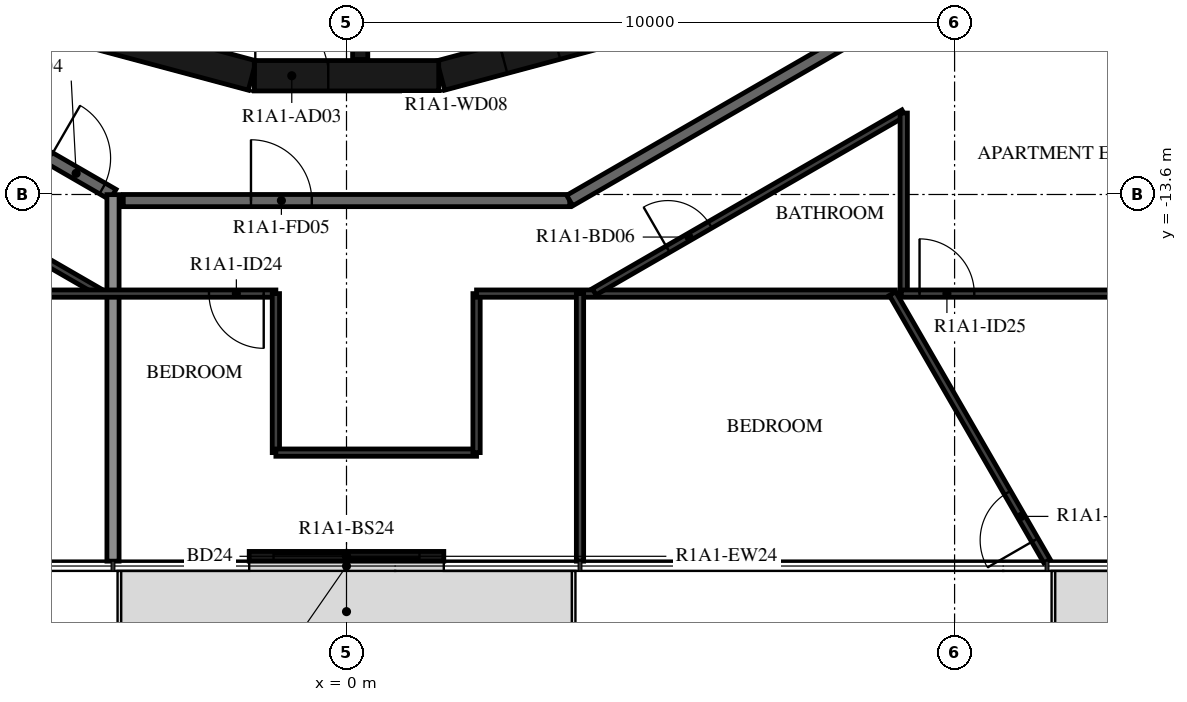
"""IFC4 building model, lengths in metres.
Left out: names, types, materials, properties, quantities, classifications, styles, units other than length and angle.
Written with IfcOpenShell. Run it as: python <this file> out.ifc"""

import sys

from ifc_helpers import new_model, si_unit, direction, frame, frame_2d, origin, place, context, subcontext, project, spatial, rectangle, extrude, element, fill, save


model = new_model("IFC4")
c1 = context("Model", 3, precision=1e-05, world=origin(), true_north=direction((0.0, 1.0)))
c2 = subcontext(c1, "Body", "Model", "MODEL_VIEW")
j1 = project(units=[si_unit("LENGTHUNIT", "METRE"), si_unit("PLANEANGLEUNIT", "RADIAN")], contexts=[c1])
p1 = place(None, origin())
s1 = spatial("IfcSite", under=j1, at=p1, CompositionType="ELEMENT")
p2 = place(p1, origin())
s2 = spatial("IfcBuilding", under=s1, at=p2, CompositionType="ELEMENT")
p3 = place(p2, frame((0.0, 0.0, 41.9)))
s3 = spatial("IfcBuildingStorey", under=s2, at=p3, CompositionType="ELEMENT", Elevation=41.9)
p4 = place(p3, frame((-1.6, -19.55, 0.0), z_axis=(0.0, 0.0, 1.0), x_axis=(1.0, 0.0, 0.0)))
e1 = element("IfcWall", 1, at=p4, inside=s3, PredefinedType="STANDARD", context=c2, shape_type="SweptSolid", body=[
    extrude(rectangle(XDim=3.2, YDim=0.16, at=frame_2d((1.6, 0.0))), origin(), (0.0, 0.0, 1.0), 3.12),
])
p5 = place(p4, frame((0.4, 0.0, 0.0)))
e2 = element("IfcOpeningElement", 2, at=p5, cuts=e1, PredefinedType="OPENING", context=c2, shape_type="SweptSolid", body=[
    extrude(rectangle(XDim=2.4, YDim=2.4, at=frame_2d((1.2, 1.2))), frame((0.0, 0.09, 0.0), z_axis=(0.0, -1.0, 0.0), x_axis=(1.0, 0.0, 0.0)), (0.0, 0.0, 1.0), 0.18),
])
p6 = place(p3, frame((1.55, -11.643, 0.0), z_axis=(0.0, 0.0, 1.0), x_axis=(0.965948410781, 0.258734743916, 0.0)))
e3 = element("IfcWall", 3, at=p6, inside=s3, PredefinedType="SHEAR", context=c2, shape_type="SweptSolid", body=[
    extrude(rectangle(XDim=3.033, YDim=0.5, at=frame_2d((1.516, 0.0))), origin(), (0.0, 0.0, 1.0), 3.12),
])
p7 = place(p6, frame((1.066, 0.0, 0.0)))
e4 = element("IfcOpeningElement", 4, at=p7, cuts=e3, PredefinedType="OPENING", context=c2, shape_type="SweptSolid", body=[
    extrude(rectangle(XDim=0.9, YDim=2.1, at=frame_2d((0.45, 1.05))), frame((0.0, 0.26, 0.0), z_axis=(0.0, -1.0, 0.0), x_axis=(1.0, 0.0, 0.0)), (0.0, 0.0, 1.0), 0.52),
])
p8 = place(p3, frame((-4.479, -10.858, 0.0), z_axis=(0.0, 0.0, 1.0), x_axis=(0.965948410781, -0.258734743916, 0.0)))
e5 = element("IfcWall", 5, at=p8, inside=s3, PredefinedType="SHEAR", context=c2, shape_type="SweptSolid", body=[
    extrude(rectangle(XDim=3.033, YDim=0.5, at=frame_2d((1.516, 0.0))), origin(), (0.0, 0.0, 1.0), 3.12),
])
p9 = place(p3, frame((-1.516, -11.647, 0.0), z_axis=(0.0, 0.0, 1.0), x_axis=(1.0, 0.0, 0.0)))
e6 = element("IfcWall", 6, at=p9, inside=s3, PredefinedType="SHEAR", context=c2, shape_type="SweptSolid", body=[
    extrude(rectangle(XDim=3.033, YDim=0.5, at=frame_2d((1.516, 0.0))), origin(), (0.0, 0.0, 1.0), 3.12),
])
p10 = place(p9, frame((0.016, 0.0, 0.0)))
e7 = element("IfcOpeningElement", 7, at=p10, cuts=e6, PredefinedType="OPENING", context=c2, shape_type="SweptSolid", body=[
    extrude(rectangle(XDim=1.2, YDim=2.1, at=frame_2d((0.6, 1.05))), frame((0.0, 0.26, 0.0), z_axis=(0.0, -1.0, 0.0), x_axis=(1.0, 0.0, 0.0)), (0.0, 0.0, 1.0), 0.52),
])
p11 = place(p3, frame((0.225, -8.97, 0.0), z_axis=(0.0, 0.0, 1.0), x_axis=(0.0, -1.0, 0.0)))
e8 = element("IfcWall", 8, at=p11, inside=s3, PredefinedType="SHEAR", context=c2, shape_type="SweptSolid", body=[
    extrude(rectangle(XDim=2.41, YDim=0.25, at=frame_2d((1.205, 0.0))), origin(), (0.0, 0.0, 1.0), 3.12),
])
p12 = place(p3, frame((-10.029, -10.029, 0.0), z_axis=(0.0, 0.0, 1.0), x_axis=(0.866022878987, -0.500004373052, 0.0)))
e9 = element("IfcWall", 9, at=p12, inside=s3, PredefinedType="STANDARD", context=c2, shape_type="SweptSolid", body=[
    extrude(rectangle(XDim=7.146, YDim=0.2, at=frame_2d((3.573, 0.0))), origin(), (0.0, 0.0, 1.0), 3.12),
])
p13 = place(p12, frame((5.947, 0.0, 0.0)))
e10 = element("IfcOpeningElement", 10, at=p13, cuts=e9, PredefinedType="OPENING", context=c2, shape_type="SweptSolid", body=[
    extrude(rectangle(XDim=1.0, YDim=2.1, at=frame_2d((0.5, 1.05))), frame((0.0, 0.11, 0.0), z_axis=(0.0, -1.0, 0.0), x_axis=(1.0, 0.0, 0.0)), (0.0, 0.0, 1.0), 0.22),
])
p14 = place(p3, frame((-3.671, -13.7, 0.0), z_axis=(0.0, 0.0, 1.0), x_axis=(1.0, 0.0, 0.0)))
e11 = element("IfcWall", 11, at=p14, inside=s3, PredefinedType="STANDARD", context=c2, shape_type="SweptSolid", body=[
    extrude(rectangle(XDim=7.342, YDim=0.2, at=frame_2d((3.671, 0.0))), origin(), (0.0, 0.0, 1.0), 3.12),
])
p15 = place(p14, frame((2.1, 0.0, 0.0)))
e12 = element("IfcOpeningElement", 12, at=p15, cuts=e11, PredefinedType="OPENING", context=c2, shape_type="SweptSolid", body=[
    extrude(rectangle(XDim=1.0, YDim=2.1, at=frame_2d((0.5, 1.05))), frame((0.0, 0.11, 0.0), z_axis=(0.0, -1.0, 0.0), x_axis=(1.0, 0.0, 0.0)), (0.0, 0.0, 1.0), 0.22),
])
p16 = place(p3, frame((3.671, -13.7, 0.0), z_axis=(0.0, 0.0, 1.0), x_axis=(0.866024439905, 0.500001669485, 0.0)))
e13 = element("IfcWall", 13, at=p16, inside=s3, PredefinedType="STANDARD", context=c2, shape_type="SweptSolid", body=[
    extrude(rectangle(XDim=7.342, YDim=0.2, at=frame_2d((3.671, 0.0))), origin(), (0.0, 0.0, 1.0), 3.12),
])
p17 = place(p3, frame((-3.84, -19.63, 0.0), z_axis=(0.0, 0.0, 1.0), x_axis=(0.0, 1.0, 0.0)))
e14 = element("IfcWall", 14, at=p17, inside=s3, PredefinedType="STANDARD", context=c2, shape_type="SweptSolid", body=[
    extrude(rectangle(XDim=6.028, YDim=0.2, at=frame_2d((3.014, 0.0))), origin(), (0.0, 0.0, 1.0), 2.73),
])
p18 = place(p3, frame((-11.127, -11.127, 0.0), z_axis=(0.0, 0.0, 1.0), x_axis=(0.866032360344, -0.499987950692, 0.0)))
e15 = element("IfcWall", 15, at=p18, inside=s3, PredefinedType="PARTITIONING", context=c2, shape_type="SweptSolid", body=[
    extrude(rectangle(XDim=8.146, YDim=0.12, at=frame_2d((4.073, 0.0))), origin(), (0.0, 0.0, 1.0), 3.12),
])
p19 = place(p18, frame((1.357, 0.0, 0.0)))
e16 = element("IfcOpeningElement", 16, at=p19, cuts=e15, PredefinedType="OPENING", context=c2, shape_type="SweptSolid", body=[
    extrude(rectangle(XDim=0.8, YDim=2.1, at=frame_2d((0.4, 1.05))), frame((0.0, 0.07, 0.0), z_axis=(0.0, -1.0, 0.0), x_axis=(1.0, 0.0, 0.0)), (0.0, 0.0, 1.0), 0.14),
])
p20 = place(p3, frame((-1.161, -15.23, 0.0), z_axis=(0.0, 0.0, 1.0), x_axis=(-1.0, 0.0, 0.0)))
e17 = element("IfcWall", 17, at=p20, inside=s3, PredefinedType="PARTITIONING", context=c2, shape_type="SweptSolid", body=[
    extrude(rectangle(XDim=18.726, YDim=0.12, at=frame_2d((9.363, 0.0))), origin(), (0.0, 0.0, 1.0), 3.12),
])
p21 = place(p20, frame((9.297, 0.0, 0.0)))
e18 = element("IfcOpeningElement", 18, at=p21, cuts=e17, PredefinedType="OPENING", context=c2, shape_type="SweptSolid", body=[
    extrude(rectangle(XDim=0.9, YDim=2.1, at=frame_2d((0.45, 1.05))), frame((0.0, 0.07, 0.0), z_axis=(0.0, -1.0, 0.0), x_axis=(1.0, 0.0, 0.0)), (0.0, 0.0, 1.0), 0.14),
])
p22 = place(p20, frame((15.755, 0.0, 0.0)))
e19 = element("IfcOpeningElement", 19, at=p22, cuts=e17, PredefinedType="OPENING", context=c2, shape_type="SweptSolid", body=[
    extrude(rectangle(XDim=0.9, YDim=2.1, at=frame_2d((0.45, 1.05))), frame((0.0, 0.07, 0.0), z_axis=(0.0, -1.0, 0.0), x_axis=(1.0, 0.0, 0.0)), (0.0, 0.0, 1.0), 0.14),
])
p23 = place(p20, frame((0.2, 0.0, 0.0)))
e20 = element("IfcOpeningElement", 20, at=p23, cuts=e17, PredefinedType="OPENING", context=c2, shape_type="SweptSolid", body=[
    extrude(rectangle(XDim=0.9, YDim=2.1, at=frame_2d((0.45, 1.05))), frame((0.0, 0.07, 0.0), z_axis=(0.0, -1.0, 0.0), x_axis=(1.0, 0.0, 0.0)), (0.0, 0.0, 1.0), 0.14),
])
p24 = place(p3, frame((-1.161, -15.23, 0.0), z_axis=(0.0, 0.0, 1.0), x_axis=(0.0, -1.0, 0.0)))
e21 = element("IfcWall", 21, at=p24, inside=s3, PredefinedType="PARTITIONING", context=c2, shape_type="SweptSolid", body=[
    extrude(rectangle(XDim=2.615, YDim=0.12, at=frame_2d((1.308, 0.0))), origin(), (0.0, 0.0, 1.0), 3.12),
])
p25 = place(p3, frame((-1.161, -17.845, 0.0), z_axis=(0.0, 0.0, 1.0), x_axis=(1.0, 0.0, 0.0)))
e22 = element("IfcWall", 22, at=p25, inside=s3, PredefinedType="PARTITIONING", context=c2, shape_type="SweptSolid", body=[
    extrude(rectangle(XDim=3.3, YDim=0.12, at=frame_2d((1.65, 0.0))), origin(), (0.0, 0.0, 1.0), 3.12),
])
p26 = place(p3, frame((2.139, -17.845, 0.0), z_axis=(0.0, 0.0, 1.0), x_axis=(0.0, 1.0, 0.0)))
e23 = element("IfcWall", 23, at=p26, inside=s3, PredefinedType="PARTITIONING", context=c2, shape_type="SweptSolid", body=[
    extrude(rectangle(XDim=2.615, YDim=0.12, at=frame_2d((1.308, 0.0))), origin(), (0.0, 0.0, 1.0), 3.12),
])
p27 = place(p3, frame((2.139, -15.23, 0.0), z_axis=(0.0, 0.0, 1.0), x_axis=(1.0, 0.0, 0.0)))
e24 = element("IfcWall", 24, at=p27, inside=s3, PredefinedType="PARTITIONING", context=c2, shape_type="SweptSolid", body=[
    extrude(rectangle(XDim=6.887, YDim=0.12, at=frame_2d((3.444, 0.0))), origin(), (0.0, 0.0, 1.0), 3.12),
])
p28 = place(p3, frame((4.073, -15.2, 0.0), z_axis=(0.0, 0.0, 1.0), x_axis=(0.866034128446, 0.499984888139, 0.0)))
e25 = element("IfcWall", 25, at=p28, inside=s3, PredefinedType="PARTITIONING", context=c2, shape_type="SweptSolid", body=[
    extrude(rectangle(XDim=5.879, YDim=0.12, at=frame_2d((2.939, 0.0))), origin(), (0.0, 0.0, 1.0), 3.12),
])
p29 = place(p28, frame((1.4, 0.0, 0.0)))
e26 = element("IfcOpeningElement", 26, at=p29, cuts=e25, PredefinedType="OPENING", context=c2, shape_type="SweptSolid", body=[
    extrude(rectangle(XDim=0.8, YDim=2.1, at=frame_2d((0.4, 1.05))), frame((0.0, 0.07, 0.0), z_axis=(0.0, -1.0, 0.0), x_axis=(1.0, 0.0, 0.0)), (0.0, 0.0, 1.0), 0.14),
])
p30 = place(p3, frame((9.164, -12.261, 0.0), z_axis=(0.0, 0.0, 1.0), x_axis=(0.0, -1.0, 0.0)))
e27 = element("IfcWall", 27, at=p30, inside=s3, PredefinedType="PARTITIONING", context=c2, shape_type="SweptSolid", body=[
    extrude(rectangle(XDim=2.969, YDim=0.12, at=frame_2d((1.485, 0.0))), origin(), (0.0, 0.0, 1.0), 3.12),
])
p31 = place(p3, frame((9.124, -15.23, 0.0), z_axis=(0.0, 0.0, 1.0), x_axis=(1.0, 0.0, 0.0)))
e28 = element("IfcWall", 28, at=p31, inside=s3, PredefinedType="PARTITIONING", context=c2, shape_type="SweptSolid", body=[
    extrude(rectangle(XDim=10.764, YDim=0.12, at=frame_2d((5.382, 0.0))), origin(), (0.0, 0.0, 1.0), 3.12),
])
p32 = place(p31, frame((0.3, 0.0, 0.0)))
e29 = element("IfcOpeningElement", 29, at=p32, cuts=e28, PredefinedType="OPENING", context=c2, shape_type="SweptSolid", body=[
    extrude(rectangle(XDim=0.9, YDim=2.1, at=frame_2d((0.45, 1.05))), frame((0.0, 0.07, 0.0), z_axis=(0.0, -1.0, 0.0), x_axis=(1.0, 0.0, 0.0)), (0.0, 0.0, 1.0), 0.14),
])
p33 = place(p31, frame((7.665, 0.0, 0.0)))
e30 = element("IfcOpeningElement", 30, at=p33, cuts=e28, PredefinedType="OPENING", context=c2, shape_type="SweptSolid", body=[
    extrude(rectangle(XDim=0.9, YDim=2.1, at=frame_2d((0.45, 1.05))), frame((0.0, 0.07, 0.0), z_axis=(0.0, -1.0, 0.0), x_axis=(1.0, 0.0, 0.0)), (0.0, 0.0, 1.0), 0.14),
])
p34 = place(p3, frame((3.84, -19.63, 0.0), z_axis=(0.0, 0.0, 1.0), x_axis=(0.0, 1.0, 0.0)))
e31 = element("IfcWall", 31, at=p34, inside=s3, PredefinedType="PARTITIONING", context=c2, shape_type="SweptSolid", body=[
    extrude(rectangle(XDim=4.4, YDim=0.12, at=frame_2d((2.2, 0.0))), origin(), (0.0, 0.0, 1.0), 2.73),
])
p35 = place(p3, frame((11.52, -19.63, 0.0), z_axis=(0.0, 0.0, 1.0), x_axis=(-0.499999763888, 0.866025540104, 0.0)))
e32 = element("IfcWall", 32, at=p35, inside=s3, PredefinedType="PARTITIONING", context=c2, shape_type="SweptSolid", body=[
    extrude(rectangle(XDim=5.081, YDim=0.12, at=frame_2d((2.54, 0.0))), origin(), (0.0, 0.0, 1.0), 3.12),
])
p36 = place(p35, frame((0.4, 0.0, 0.0)))
e33 = element("IfcOpeningElement", 33, at=p36, cuts=e32, PredefinedType="OPENING", context=c2, shape_type="SweptSolid", body=[
    extrude(rectangle(XDim=0.9, YDim=2.1, at=frame_2d((0.45, 1.05))), frame((0.0, 0.07, 0.0), z_axis=(0.0, -1.0, 0.0), x_axis=(1.0, 0.0, 0.0)), (0.0, 0.0, 1.0), 0.14),
])
p37 = place(p5, origin())
e34 = element("IfcDoor", 34, at=p37, inside=s3, OperationType="DOUBLE_DOOR_SLIDING", PredefinedType="DOOR", context=c2, shape_type="SweptSolid", body=[
    extrude(rectangle(XDim=2.4, YDim=2.4, at=frame_2d((1.2, 1.2))), frame((0.0, 0.025, 0.0), z_axis=(0.0, -1.0, 0.0), x_axis=(1.0, 0.0, 0.0)), (0.0, 0.0, 1.0), 0.05),
])
fill(e2, e34)
p38 = place(p10, origin())
e35 = element("IfcDoor", 35, at=p38, inside=s3, OperationType="SINGLE_SWING_RIGHT", PredefinedType="DOOR", context=c2, shape_type="SweptSolid", body=[
    extrude(rectangle(XDim=1.2, YDim=2.1, at=frame_2d((0.6, 1.05))), frame((0.0, 0.025, 0.0), z_axis=(0.0, -1.0, 0.0), x_axis=(1.0, 0.0, 0.0)), (0.0, 0.0, 1.0), 0.05),
])
fill(e7, e35)
p39 = place(p7, origin())
e36 = element("IfcDoor", 36, at=p39, inside=s3, OperationType="SINGLE_SWING_LEFT", PredefinedType="DOOR", context=c2, shape_type="SweptSolid", body=[
    extrude(rectangle(XDim=0.9, YDim=2.1, at=frame_2d((0.45, 1.05))), frame((0.0, 0.025, 0.0), z_axis=(0.0, -1.0, 0.0), x_axis=(1.0, 0.0, 0.0)), (0.0, 0.0, 1.0), 0.05),
])
fill(e4, e36)
p40 = place(p13, origin())
e37 = element("IfcDoor", 37, at=p40, inside=s3, OperationType="SINGLE_SWING_LEFT", PredefinedType="DOOR", context=c2, shape_type="SweptSolid", body=[
    extrude(rectangle(XDim=1.0, YDim=2.1, at=frame_2d((0.5, 1.05))), frame((0.0, 0.025, 0.0), z_axis=(0.0, -1.0, 0.0), x_axis=(1.0, 0.0, 0.0)), (0.0, 0.0, 1.0), 0.05),
])
fill(e10, e37)
p41 = place(p15, origin())
e38 = element("IfcDoor", 38, at=p41, inside=s3, OperationType="SINGLE_SWING_LEFT", PredefinedType="DOOR", context=c2, shape_type="SweptSolid", body=[
    extrude(rectangle(XDim=1.0, YDim=2.1, at=frame_2d((0.5, 1.05))), frame((0.0, 0.025, 0.0), z_axis=(0.0, -1.0, 0.0), x_axis=(1.0, 0.0, 0.0)), (0.0, 0.0, 1.0), 0.05),
])
fill(e12, e38)
p42 = place(p23, origin())
e39 = element("IfcDoor", 39, at=p42, inside=s3, OperationType="SINGLE_SWING_LEFT", PredefinedType="DOOR", context=c2, shape_type="SweptSolid", body=[
    extrude(rectangle(XDim=0.9, YDim=2.1, at=frame_2d((0.45, 1.05))), frame((0.0, 0.025, 0.0), z_axis=(0.0, -1.0, 0.0), x_axis=(1.0, 0.0, 0.0)), (0.0, 0.0, 1.0), 0.05),
])
fill(e20, e39)
p43 = place(p29, origin())
e40 = element("IfcDoor", 40, at=p43, inside=s3, OperationType="SINGLE_SWING_RIGHT", PredefinedType="DOOR", context=c2, shape_type="SweptSolid", body=[
    extrude(rectangle(XDim=0.8, YDim=2.1, at=frame_2d((0.4, 1.05))), frame((0.0, 0.025, 0.0), z_axis=(0.0, -1.0, 0.0), x_axis=(1.0, 0.0, 0.0)), (0.0, 0.0, 1.0), 0.05),
])
fill(e26, e40)
p44 = place(p32, origin())
e41 = element("IfcDoor", 41, at=p44, inside=s3, OperationType="SINGLE_SWING_RIGHT", PredefinedType="DOOR", context=c2, shape_type="SweptSolid", body=[
    extrude(rectangle(XDim=0.9, YDim=2.1, at=frame_2d((0.45, 1.05))), frame((0.0, 0.025, 0.0), z_axis=(0.0, -1.0, 0.0), x_axis=(1.0, 0.0, 0.0)), (0.0, 0.0, 1.0), 0.05),
])
fill(e29, e41)
p45 = place(p36, origin())
e42 = element("IfcDoor", 42, at=p45, inside=s3, OperationType="SINGLE_SWING_LEFT", PredefinedType="DOOR", context=c2, shape_type="SweptSolid", body=[
    extrude(rectangle(XDim=0.9, YDim=2.1, at=frame_2d((0.45, 1.05))), frame((0.0, 0.025, 0.0), z_axis=(0.0, -1.0, 0.0), x_axis=(1.0, 0.0, 0.0)), (0.0, 0.0, 1.0), 0.05),
])
fill(e33, e42)
save(model, sys.argv[1])
